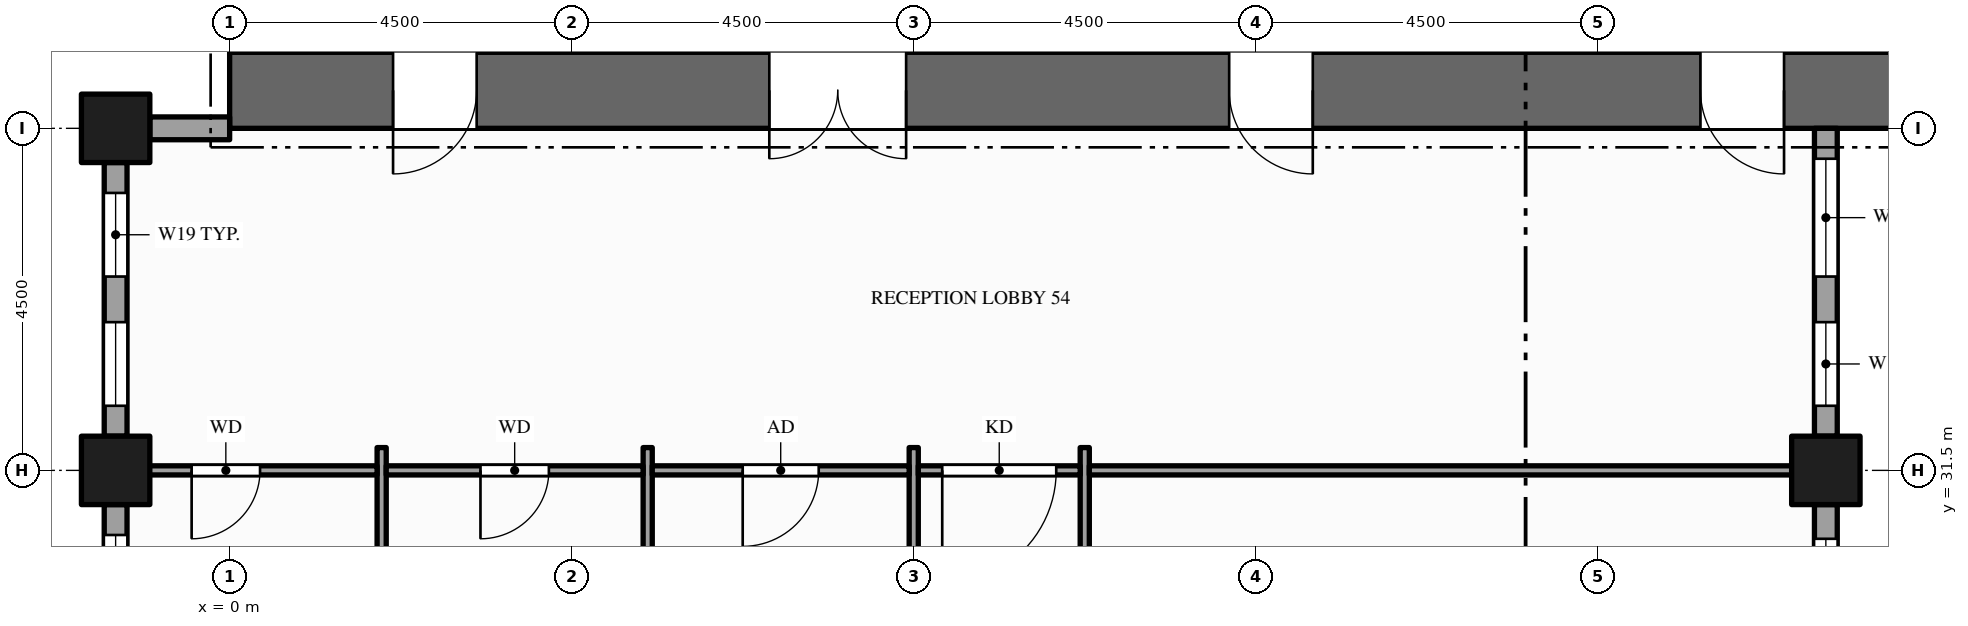
"""IFC4 building model, lengths in metres.
Left out: names, types, materials, properties, quantities, classifications, styles, units other than length and angle.
Written with IfcOpenShell. Run it as: python <this file> out.ifc"""

import sys

from ifc_helpers import new_model, si_unit, direction, frame, frame_2d, origin, origin_2d, place, context, subcontext, project, spatial, rectangle, hollow_rectangle, extrude, element, fill, save


model = new_model("IFC4")
c1 = context("Model", 3, precision=1e-05, world=origin(), true_north=direction((0.0, 1.0)))
c2 = subcontext(c1, "Body", "Model", "MODEL_VIEW")
j1 = project(units=[si_unit("LENGTHUNIT", "METRE"), si_unit("PLANEANGLEUNIT", "RADIAN")], contexts=[c1])
p1 = place(None, origin())
s1 = spatial("IfcSite", under=j1, at=p1, CompositionType="ELEMENT")
p2 = place(p1, origin())
s2 = spatial("IfcBuilding", under=s1, at=p2, CompositionType="ELEMENT")
p3 = place(p2, frame((0.0, 0.0, 147.0)))
s3 = spatial("IfcBuildingStorey", under=s2, at=p3, CompositionType="ELEMENT", Elevation=147.0)
p4 = place(p3, frame((0.0, 36.5, -0.15), z_axis=(0.0, 0.0, 1.0), x_axis=(1.0, 0.0, 0.0)))
e1 = element("IfcWall", 1, at=p4, inside=s3, PredefinedType="SHEAR", context=c2, shape_type="SweptSolid", body=[
    extrude(rectangle(XDim=22.5, YDim=1.0, at=frame_2d((11.25, 0.0))), origin(), (0.0, 0.0, 1.0), 4.0),
])
p5 = place(p4, frame((7.1, 0.0, 0.15)))
e2 = element("IfcOpeningElement", 2, at=p5, cuts=e1, PredefinedType="OPENING", context=c2, shape_type="SweptSolid", body=[
    extrude(rectangle(XDim=1.8, YDim=2.1, at=frame_2d((0.9, 1.05))), frame((0.0, 0.51, 0.0), z_axis=(0.0, -1.0, 0.0), x_axis=(1.0, 0.0, 0.0)), (0.0, 0.0, 1.0), 1.02),
])
p6 = place(p4, frame((13.15, 0.0, 0.15)))
e3 = element("IfcOpeningElement", 3, at=p6, cuts=e1, PredefinedType="OPENING", context=c2, shape_type="SweptSolid", body=[
    extrude(rectangle(XDim=1.1, YDim=2.1, at=frame_2d((0.55, 1.05))), frame((0.0, 0.51, 0.0), z_axis=(0.0, -1.0, 0.0), x_axis=(1.0, 0.0, 0.0)), (0.0, 0.0, 1.0), 1.02),
])
p7 = place(p4, frame((2.15, 0.0, 0.15)))
e4 = element("IfcOpeningElement", 4, at=p7, cuts=e1, PredefinedType="OPENING", context=c2, shape_type="SweptSolid", body=[
    extrude(rectangle(XDim=1.1, YDim=2.1, at=frame_2d((0.55, 1.05))), frame((0.0, 0.51, 0.0), z_axis=(0.0, -1.0, 0.0), x_axis=(1.0, 0.0, 0.0)), (0.0, 0.0, 1.0), 1.02),
])
p8 = place(p4, frame((19.35, 0.0, 0.15)))
e5 = element("IfcOpeningElement", 5, at=p8, cuts=e1, PredefinedType="OPENING", context=c2, shape_type="SweptSolid", body=[
    extrude(rectangle(XDim=1.1, YDim=2.1, at=frame_2d((0.55, 1.05))), frame((0.0, 0.51, 0.0), z_axis=(0.0, -1.0, 0.0), x_axis=(1.0, 0.0, 0.0)), (0.0, 0.0, 1.0), 1.02),
])
for number, where, z_axis, x_axis in (
    (6, (-1.5, 31.5, -0.15), (0.0, 0.0, 1.0), (1.0, 0.0, 0.0)),
    (7, (-1.5, 36.0, -0.15), (0.0, 0.0, 1.0), (1.0, 0.0, 0.0)),
    (8, (21.0, 31.5, -0.15), (0.0, 0.0, 1.0), (1.0, 0.0, 0.0)),
):
    element("IfcColumn", number, at=place(p3, frame(where, z_axis=z_axis, x_axis=x_axis)), inside=s3, PredefinedType="COLUMN", context=c2, shape_type="SweptSolid", body=[
        extrude(hollow_rectangle(XDim=0.9, YDim=0.9, WallThickness=0.045, at=origin_2d()), origin(), (0.0, 0.0, 1.0), 4.0),
    ])
p9 = place(p3, frame((21.0, 28.95, 0.0), z_axis=(0.0, 0.0, 1.0), x_axis=(0.0, 1.0, 0.0)))
e9 = element("IfcWall", 9, at=p9, inside=s3, PredefinedType="STANDARD", context=c2, shape_type="SweptSolid", body=[
    extrude(rectangle(XDim=2.1, YDim=0.3, at=frame_2d((1.05, 0.0))), origin(), (0.0, 0.0, 1.0), 3.149),
])
p10 = place(p9, frame((0.45, 0.0, 0.9)))
e10 = element("IfcOpeningElement", 10, at=p10, cuts=e9, PredefinedType="OPENING", context=c2, shape_type="SweptSolid", body=[
    extrude(rectangle(XDim=1.2, YDim=2.0, at=frame_2d((0.6, 1.0))), frame((0.0, 0.16, 0.0), z_axis=(0.0, -1.0, 0.0), x_axis=(1.0, 0.0, 0.0)), (0.0, 0.0, 1.0), 0.32),
])
p11 = place(p3, frame((21.0, 31.95, 0.0), z_axis=(0.0, 0.0, 1.0), x_axis=(0.0, 1.0, 0.0)))
e11 = element("IfcWall", 11, at=p11, inside=s3, PredefinedType="STANDARD", context=c2, shape_type="SweptSolid", body=[
    extrude(rectangle(XDim=4.05, YDim=0.3, at=frame_2d((2.025, 0.0))), origin(), (0.0, 0.0, 1.0), 3.149),
])
p12 = place(p11, frame((0.4, 0.0, 0.9)))
e12 = element("IfcOpeningElement", 12, at=p12, cuts=e11, PredefinedType="OPENING", context=c2, shape_type="SweptSolid", body=[
    extrude(rectangle(XDim=1.1, YDim=2.0, at=frame_2d((0.55, 1.0))), frame((0.0, 0.16, 0.0), z_axis=(0.0, -1.0, 0.0), x_axis=(1.0, 0.0, 0.0)), (0.0, 0.0, 1.0), 0.32),
])
p13 = place(p11, frame((2.1, 0.0, 0.9)))
e13 = element("IfcOpeningElement", 13, at=p13, cuts=e11, PredefinedType="OPENING", context=c2, shape_type="SweptSolid", body=[
    extrude(rectangle(XDim=1.55, YDim=2.0, at=frame_2d((0.775, 1.0))), frame((0.0, 0.16, 0.0), z_axis=(0.0, -1.0, 0.0), x_axis=(1.0, 0.0, 0.0)), (0.0, 0.0, 1.0), 0.32),
])
p14 = place(p3, frame((0.0, 36.0, 0.0), z_axis=(0.0, 0.0, 1.0), x_axis=(-1.0, 0.0, 0.0)))
e14 = element("IfcWall", 14, at=p14, inside=s3, PredefinedType="STANDARD", context=c2, shape_type="SweptSolid", body=[
    extrude(rectangle(XDim=1.05, YDim=0.3, at=frame_2d((0.525, 0.0))), origin(), (0.0, 0.0, 1.0), 2.87),
])
p15 = place(p3, frame((-1.5, 35.55, 0.0), z_axis=(0.0, 0.0, 1.0), x_axis=(0.0, -1.0, 0.0)))
e15 = element("IfcWall", 15, at=p15, inside=s3, PredefinedType="STANDARD", context=c2, shape_type="SweptSolid", body=[
    extrude(rectangle(XDim=3.6, YDim=0.3, at=frame_2d((1.8, 0.0))), origin(), (0.0, 0.0, 1.0), 3.149),
])
p16 = place(p15, frame((0.4, 0.0, 0.9)))
e16 = element("IfcOpeningElement", 16, at=p16, cuts=e15, PredefinedType="OPENING", context=c2, shape_type="SweptSolid", body=[
    extrude(rectangle(XDim=1.1, YDim=2.0, at=frame_2d((0.55, 1.0))), frame((0.0, 0.16, 0.0), z_axis=(0.0, -1.0, 0.0), x_axis=(1.0, 0.0, 0.0)), (0.0, 0.0, 1.0), 0.32),
])
p17 = place(p15, frame((2.1, 0.0, 0.9)))
e17 = element("IfcOpeningElement", 17, at=p17, cuts=e15, PredefinedType="OPENING", context=c2, shape_type="SweptSolid", body=[
    extrude(rectangle(XDim=1.1, YDim=2.0, at=frame_2d((0.55, 1.0))), frame((0.0, 0.16, 0.0), z_axis=(0.0, -1.0, 0.0), x_axis=(1.0, 0.0, 0.0)), (0.0, 0.0, 1.0), 0.32),
])
p18 = place(p3, frame((-1.5, 31.05, 0.0), z_axis=(0.0, 0.0, 1.0), x_axis=(0.0, -1.0, 0.0)))
e18 = element("IfcWall", 18, at=p18, inside=s3, PredefinedType="STANDARD", context=c2, shape_type="SweptSolid", body=[
    extrude(rectangle(XDim=3.6, YDim=0.3, at=frame_2d((1.8, 0.0))), origin(), (0.0, 0.0, 1.0), 3.149),
])
p19 = place(p18, frame((0.4, 0.0, 0.9)))
e19 = element("IfcOpeningElement", 19, at=p19, cuts=e18, PredefinedType="OPENING", context=c2, shape_type="SweptSolid", body=[
    extrude(rectangle(XDim=1.1, YDim=2.0, at=frame_2d((0.55, 1.0))), frame((0.0, 0.16, 0.0), z_axis=(0.0, -1.0, 0.0), x_axis=(1.0, 0.0, 0.0)), (0.0, 0.0, 1.0), 0.32),
])
p20 = place(p18, frame((2.1, 0.0, 0.9)))
e20 = element("IfcOpeningElement", 20, at=p20, cuts=e18, PredefinedType="OPENING", context=c2, shape_type="SweptSolid", body=[
    extrude(rectangle(XDim=1.1, YDim=2.0, at=frame_2d((0.55, 1.0))), frame((0.0, 0.16, 0.0), z_axis=(0.0, -1.0, 0.0), x_axis=(1.0, 0.0, 0.0)), (0.0, 0.0, 1.0), 0.32),
])
for number, where, z_axis, x_axis in (
    (21, (2.0, 26.7, 0.0), (0.0, 0.0, 1.0), (0.0, 1.0, 0.0)),
    (22, (5.5, 26.7, 0.0), (0.0, 0.0, 1.0), (0.0, 1.0, 0.0)),
):
    element("IfcWall", number, at=place(p3, frame(where, z_axis=z_axis, x_axis=x_axis)), inside=s3, PredefinedType="PARTITIONING", context=c2, shape_type="SweptSolid", body=[
        extrude(rectangle(XDim=5.1, YDim=0.12, at=frame_2d((2.55, 0.0))), origin(), (0.0, 0.0, 1.0), 3.85),
    ])
p21 = place(p3, frame((9.0, 10.95, 0.0), z_axis=(0.0, 0.0, 1.0), x_axis=(0.0, 1.0, 0.0)))
e23 = element("IfcWall", 23, at=p21, inside=s3, PredefinedType="PARTITIONING", context=c2, shape_type="SweptSolid", body=[
    extrude(rectangle(XDim=20.85, YDim=0.12, at=frame_2d((10.425, 0.0))), origin(), (0.0, 0.0, 1.0), 2.6),
])
p22 = place(p21, frame((2.05, 0.0, 0.0)))
e24 = element("IfcOpeningElement", 24, at=p22, cuts=e23, PredefinedType="OPENING", context=c2, shape_type="SweptSolid", body=[
    extrude(rectangle(XDim=1.0, YDim=2.1, at=frame_2d((0.5, 1.05))), frame((0.0, 0.07, 0.0), z_axis=(0.0, -1.0, 0.0), x_axis=(1.0, 0.0, 0.0)), (0.0, 0.0, 1.0), 0.14),
])
p23 = place(p21, frame((6.55, 0.0, 0.0)))
e25 = element("IfcOpeningElement", 25, at=p23, cuts=e23, PredefinedType="OPENING", context=c2, shape_type="SweptSolid", body=[
    extrude(rectangle(XDim=1.0, YDim=2.1, at=frame_2d((0.5, 1.05))), frame((0.0, 0.07, 0.0), z_axis=(0.0, -1.0, 0.0), x_axis=(1.0, 0.0, 0.0)), (0.0, 0.0, 1.0), 0.14),
])
p24 = place(p21, frame((11.805, 0.0, 0.0)))
e26 = element("IfcOpeningElement", 26, at=p24, cuts=e23, PredefinedType="OPENING", context=c2, shape_type="SweptSolid", body=[
    extrude(rectangle(XDim=1.8, YDim=2.1, at=frame_2d((0.9, 1.05))), frame((0.0, 0.07, 0.0), z_axis=(0.0, -1.0, 0.0), x_axis=(1.0, 0.0, 0.0)), (0.0, 0.0, 1.0), 0.14),
])
p25 = place(p3, frame((11.25, 10.95, 0.0), z_axis=(0.0, 0.0, 1.0), x_axis=(0.0, 1.0, 0.0)))
e27 = element("IfcWall", 27, at=p25, inside=s3, PredefinedType="PARTITIONING", context=c2, shape_type="SweptSolid", body=[
    extrude(rectangle(XDim=20.85, YDim=0.12, at=frame_2d((10.425, 0.0))), origin(), (0.0, 0.0, 1.0), 2.6),
])
p26 = place(p25, frame((17.8, 0.0, 0.0)))
e28 = element("IfcOpeningElement", 28, at=p26, cuts=e27, PredefinedType="OPENING", context=c2, shape_type="SweptSolid", body=[
    extrude(rectangle(XDim=1.0, YDim=2.1, at=frame_2d((0.5, 1.05))), frame((0.0, 0.07, 0.0), z_axis=(0.0, -1.0, 0.0), x_axis=(1.0, 0.0, 0.0)), (0.0, 0.0, 1.0), 0.14),
])
p27 = place(p25, frame((4.2, 0.0, 0.0)))
e29 = element("IfcOpeningElement", 29, at=p27, cuts=e27, PredefinedType="OPENING", context=c2, shape_type="SweptSolid", body=[
    extrude(rectangle(XDim=1.2, YDim=2.1, at=frame_2d((0.6, 1.05))), frame((0.0, 0.07, 0.0), z_axis=(0.0, -1.0, 0.0), x_axis=(1.0, 0.0, 0.0)), (0.0, 0.0, 1.0), 0.14),
])
p28 = place(p3, frame((-1.35, 31.5, 0.0), z_axis=(0.0, 0.0, 1.0), x_axis=(1.0, 0.0, 0.0)))
e30 = element("IfcWall", 30, at=p28, inside=s3, PredefinedType="PARTITIONING", context=c2, shape_type="SweptSolid", body=[
    extrude(rectangle(XDim=3.29, YDim=0.12, at=frame_2d((1.645, 0.0))), origin(), (0.0, 0.0, 1.0), 2.87),
])
p29 = place(p28, frame((0.85, 0.0, 0.0)))
e31 = element("IfcOpeningElement", 31, at=p29, cuts=e30, PredefinedType="OPENING", context=c2, shape_type="SweptSolid", body=[
    extrude(rectangle(XDim=0.9, YDim=2.1, at=frame_2d((0.45, 1.05))), frame((0.0, 0.07, 0.0), z_axis=(0.0, -1.0, 0.0), x_axis=(1.0, 0.0, 0.0)), (0.0, 0.0, 1.0), 0.14),
])
p30 = place(p3, frame((2.06, 31.5, 0.0), z_axis=(0.0, 0.0, 1.0), x_axis=(1.0, 0.0, 0.0)))
e32 = element("IfcWall", 32, at=p30, inside=s3, PredefinedType="PARTITIONING", context=c2, shape_type="SweptSolid", body=[
    extrude(rectangle(XDim=3.38, YDim=0.12, at=frame_2d((1.69, 0.0))), origin(), (0.0, 0.0, 1.0), 2.87),
])
p31 = place(p30, frame((1.24, 0.0, 0.0)))
e33 = element("IfcOpeningElement", 33, at=p31, cuts=e32, PredefinedType="OPENING", context=c2, shape_type="SweptSolid", body=[
    extrude(rectangle(XDim=0.9, YDim=2.1, at=frame_2d((0.45, 1.05))), frame((0.0, 0.07, 0.0), z_axis=(0.0, -1.0, 0.0), x_axis=(1.0, 0.0, 0.0)), (0.0, 0.0, 1.0), 0.14),
])
p32 = place(p3, frame((5.56, 31.5, 0.0), z_axis=(0.0, 0.0, 1.0), x_axis=(1.0, 0.0, 0.0)))
e34 = element("IfcWall", 34, at=p32, inside=s3, PredefinedType="PARTITIONING", context=c2, shape_type="SweptSolid", body=[
    extrude(rectangle(XDim=3.38, YDim=0.12, at=frame_2d((1.69, 0.0))), origin(), (0.0, 0.0, 1.0), 2.87),
])
p33 = place(p32, frame((1.19, 0.0, 0.0)))
e35 = element("IfcOpeningElement", 35, at=p33, cuts=e34, PredefinedType="OPENING", context=c2, shape_type="SweptSolid", body=[
    extrude(rectangle(XDim=1.0, YDim=2.1, at=frame_2d((0.5, 1.05))), frame((0.0, 0.07, 0.0), z_axis=(0.0, -1.0, 0.0), x_axis=(1.0, 0.0, 0.0)), (0.0, 0.0, 1.0), 0.14),
])
p34 = place(p3, frame((9.06, 31.5, 0.0), z_axis=(0.0, 0.0, 1.0), x_axis=(1.0, 0.0, 0.0)))
e36 = element("IfcWall", 36, at=p34, inside=s3, PredefinedType="PARTITIONING", context=c2, shape_type="SweptSolid", body=[
    extrude(rectangle(XDim=2.13, YDim=0.12, at=frame_2d((1.065, 0.0))), origin(), (0.0, 0.0, 1.0), 2.87),
])
p35 = place(p34, frame((0.315, 0.0, 0.0)))
e37 = element("IfcOpeningElement", 37, at=p35, cuts=e36, PredefinedType="OPENING", context=c2, shape_type="SweptSolid", body=[
    extrude(rectangle(XDim=1.5, YDim=2.1, at=frame_2d((0.75, 1.05))), frame((0.0, 0.07, 0.0), z_axis=(0.0, -1.0, 0.0), x_axis=(1.0, 0.0, 0.0)), (0.0, 0.0, 1.0), 0.14),
])
p36 = place(p3, frame((11.31, 31.5, 0.0), z_axis=(0.0, 0.0, 1.0), x_axis=(1.0, 0.0, 0.0)))
e38 = element("IfcWall", 38, at=p36, inside=s3, PredefinedType="PARTITIONING", context=c2, shape_type="SweptSolid", body=[
    extrude(rectangle(XDim=9.54, YDim=0.12, at=frame_2d((4.77, 0.0))), origin(), (0.0, 0.0, 1.0), 2.87),
])
p37 = place(p10, origin())
e39 = element("IfcWindow", 39, at=p37, inside=s3, PartitioningType="SINGLE_PANEL", PredefinedType="WINDOW", context=c2, shape_type="SweptSolid", body=[
    extrude(rectangle(XDim=1.2, YDim=2.0, at=frame_2d((0.6, 1.0))), frame((0.0, 0.03, 0.0), z_axis=(0.0, -1.0, 0.0), x_axis=(1.0, 0.0, 0.0)), (0.0, 0.0, 1.0), 0.06),
])
fill(e10, e39)
p38 = place(p12, origin())
e40 = element("IfcWindow", 40, at=p38, inside=s3, PartitioningType="SINGLE_PANEL", PredefinedType="WINDOW", context=c2, shape_type="SweptSolid", body=[
    extrude(rectangle(XDim=1.1, YDim=2.0, at=frame_2d((0.55, 1.0))), frame((0.0, 0.03, 0.0), z_axis=(0.0, -1.0, 0.0), x_axis=(1.0, 0.0, 0.0)), (0.0, 0.0, 1.0), 0.06),
])
fill(e12, e40)
p39 = place(p13, origin())
e41 = element("IfcWindow", 41, at=p39, inside=s3, PartitioningType="SINGLE_PANEL", PredefinedType="WINDOW", context=c2, shape_type="SweptSolid", body=[
    extrude(rectangle(XDim=1.55, YDim=2.0, at=frame_2d((0.775, 1.0))), frame((0.0, 0.03, 0.0), z_axis=(0.0, -1.0, 0.0), x_axis=(1.0, 0.0, 0.0)), (0.0, 0.0, 1.0), 0.06),
])
fill(e13, e41)
p40 = place(p16, origin())
e42 = element("IfcWindow", 42, at=p40, inside=s3, PartitioningType="SINGLE_PANEL", PredefinedType="WINDOW", context=c2, shape_type="SweptSolid", body=[
    extrude(rectangle(XDim=1.1, YDim=2.0, at=frame_2d((0.55, 1.0))), frame((0.0, 0.03, 0.0), z_axis=(0.0, -1.0, 0.0), x_axis=(1.0, 0.0, 0.0)), (0.0, 0.0, 1.0), 0.06),
])
fill(e16, e42)
p41 = place(p17, origin())
e43 = element("IfcWindow", 43, at=p41, inside=s3, PartitioningType="SINGLE_PANEL", PredefinedType="WINDOW", context=c2, shape_type="SweptSolid", body=[
    extrude(rectangle(XDim=1.1, YDim=2.0, at=frame_2d((0.55, 1.0))), frame((0.0, 0.03, 0.0), z_axis=(0.0, -1.0, 0.0), x_axis=(1.0, 0.0, 0.0)), (0.0, 0.0, 1.0), 0.06),
])
fill(e17, e43)
p42 = place(p19, origin())
e44 = element("IfcWindow", 44, at=p42, inside=s3, PartitioningType="SINGLE_PANEL", PredefinedType="WINDOW", context=c2, shape_type="SweptSolid", body=[
    extrude(rectangle(XDim=1.1, YDim=2.0, at=frame_2d((0.55, 1.0))), frame((0.0, 0.03, 0.0), z_axis=(0.0, -1.0, 0.0), x_axis=(1.0, 0.0, 0.0)), (0.0, 0.0, 1.0), 0.06),
])
fill(e19, e44)
p43 = place(p5, origin())
e45 = element("IfcDoor", 45, at=p43, inside=s3, OperationType="DOUBLE_DOOR_SINGLE_SWING", PredefinedType="DOOR", context=c2, shape_type="SweptSolid", body=[
    extrude(rectangle(XDim=1.8, YDim=2.1, at=frame_2d((0.9, 1.05))), frame((0.0, 0.025, 0.0), z_axis=(0.0, -1.0, 0.0), x_axis=(1.0, 0.0, 0.0)), (0.0, 0.0, 1.0), 0.05),
])
fill(e2, e45)
p44 = place(p6, origin())
e46 = element("IfcDoor", 46, at=p44, inside=s3, OperationType="SINGLE_SWING_RIGHT", PredefinedType="DOOR", context=c2, shape_type="SweptSolid", body=[
    extrude(rectangle(XDim=1.1, YDim=2.1, at=frame_2d((0.55, 1.05))), frame((0.0, 0.025, 0.0), z_axis=(0.0, -1.0, 0.0), x_axis=(1.0, 0.0, 0.0)), (0.0, 0.0, 1.0), 0.05),
])
fill(e3, e46)
p45 = place(p7, origin())
e47 = element("IfcDoor", 47, at=p45, inside=s3, OperationType="SINGLE_SWING_LEFT", PredefinedType="DOOR", context=c2, shape_type="SweptSolid", body=[
    extrude(rectangle(XDim=1.1, YDim=2.1, at=frame_2d((0.55, 1.05))), frame((0.0, 0.025, 0.0), z_axis=(0.0, -1.0, 0.0), x_axis=(1.0, 0.0, 0.0)), (0.0, 0.0, 1.0), 0.05),
])
fill(e4, e47)
p46 = place(p8, origin())
e48 = element("IfcDoor", 48, at=p46, inside=s3, OperationType="SINGLE_SWING_RIGHT", PredefinedType="DOOR", context=c2, shape_type="SweptSolid", body=[
    extrude(rectangle(XDim=1.1, YDim=2.1, at=frame_2d((0.55, 1.05))), frame((0.0, 0.025, 0.0), z_axis=(0.0, -1.0, 0.0), x_axis=(1.0, 0.0, 0.0)), (0.0, 0.0, 1.0), 0.05),
])
fill(e5, e48)
p47 = place(p35, origin())
e49 = element("IfcDoor", 49, at=p47, inside=s3, OperationType="SINGLE_SWING_LEFT", PredefinedType="DOOR", context=c2, shape_type="SweptSolid", body=[
    extrude(rectangle(XDim=1.5, YDim=2.1, at=frame_2d((0.75, 1.05))), frame((0.0, 0.025, 0.0), z_axis=(0.0, -1.0, 0.0), x_axis=(1.0, 0.0, 0.0)), (0.0, 0.0, 1.0), 0.05),
])
fill(e37, e49)
p48 = place(p29, origin())
e50 = element("IfcDoor", 50, at=p48, inside=s3, OperationType="SINGLE_SWING_LEFT", PredefinedType="DOOR", context=c2, shape_type="SweptSolid", body=[
    extrude(rectangle(XDim=0.9, YDim=2.1, at=frame_2d((0.45, 1.05))), frame((0.0, 0.025, 0.0), z_axis=(0.0, -1.0, 0.0), x_axis=(1.0, 0.0, 0.0)), (0.0, 0.0, 1.0), 0.05),
])
fill(e31, e50)
p49 = place(p31, origin())
e51 = element("IfcDoor", 51, at=p49, inside=s3, OperationType="SINGLE_SWING_LEFT", PredefinedType="DOOR", context=c2, shape_type="SweptSolid", body=[
    extrude(rectangle(XDim=0.9, YDim=2.1, at=frame_2d((0.45, 1.05))), frame((0.0, 0.025, 0.0), z_axis=(0.0, -1.0, 0.0), x_axis=(1.0, 0.0, 0.0)), (0.0, 0.0, 1.0), 0.05),
])
fill(e33, e51)
p50 = place(p33, origin())
e52 = element("IfcDoor", 52, at=p50, inside=s3, OperationType="SINGLE_SWING_LEFT", PredefinedType="DOOR", context=c2, shape_type="SweptSolid", body=[
    extrude(rectangle(XDim=1.0, YDim=2.1, at=frame_2d((0.5, 1.05))), frame((0.0, 0.025, 0.0), z_axis=(0.0, -1.0, 0.0), x_axis=(1.0, 0.0, 0.0)), (0.0, 0.0, 1.0), 0.05),
])
fill(e35, e52)
save(model, sys.argv[1])
